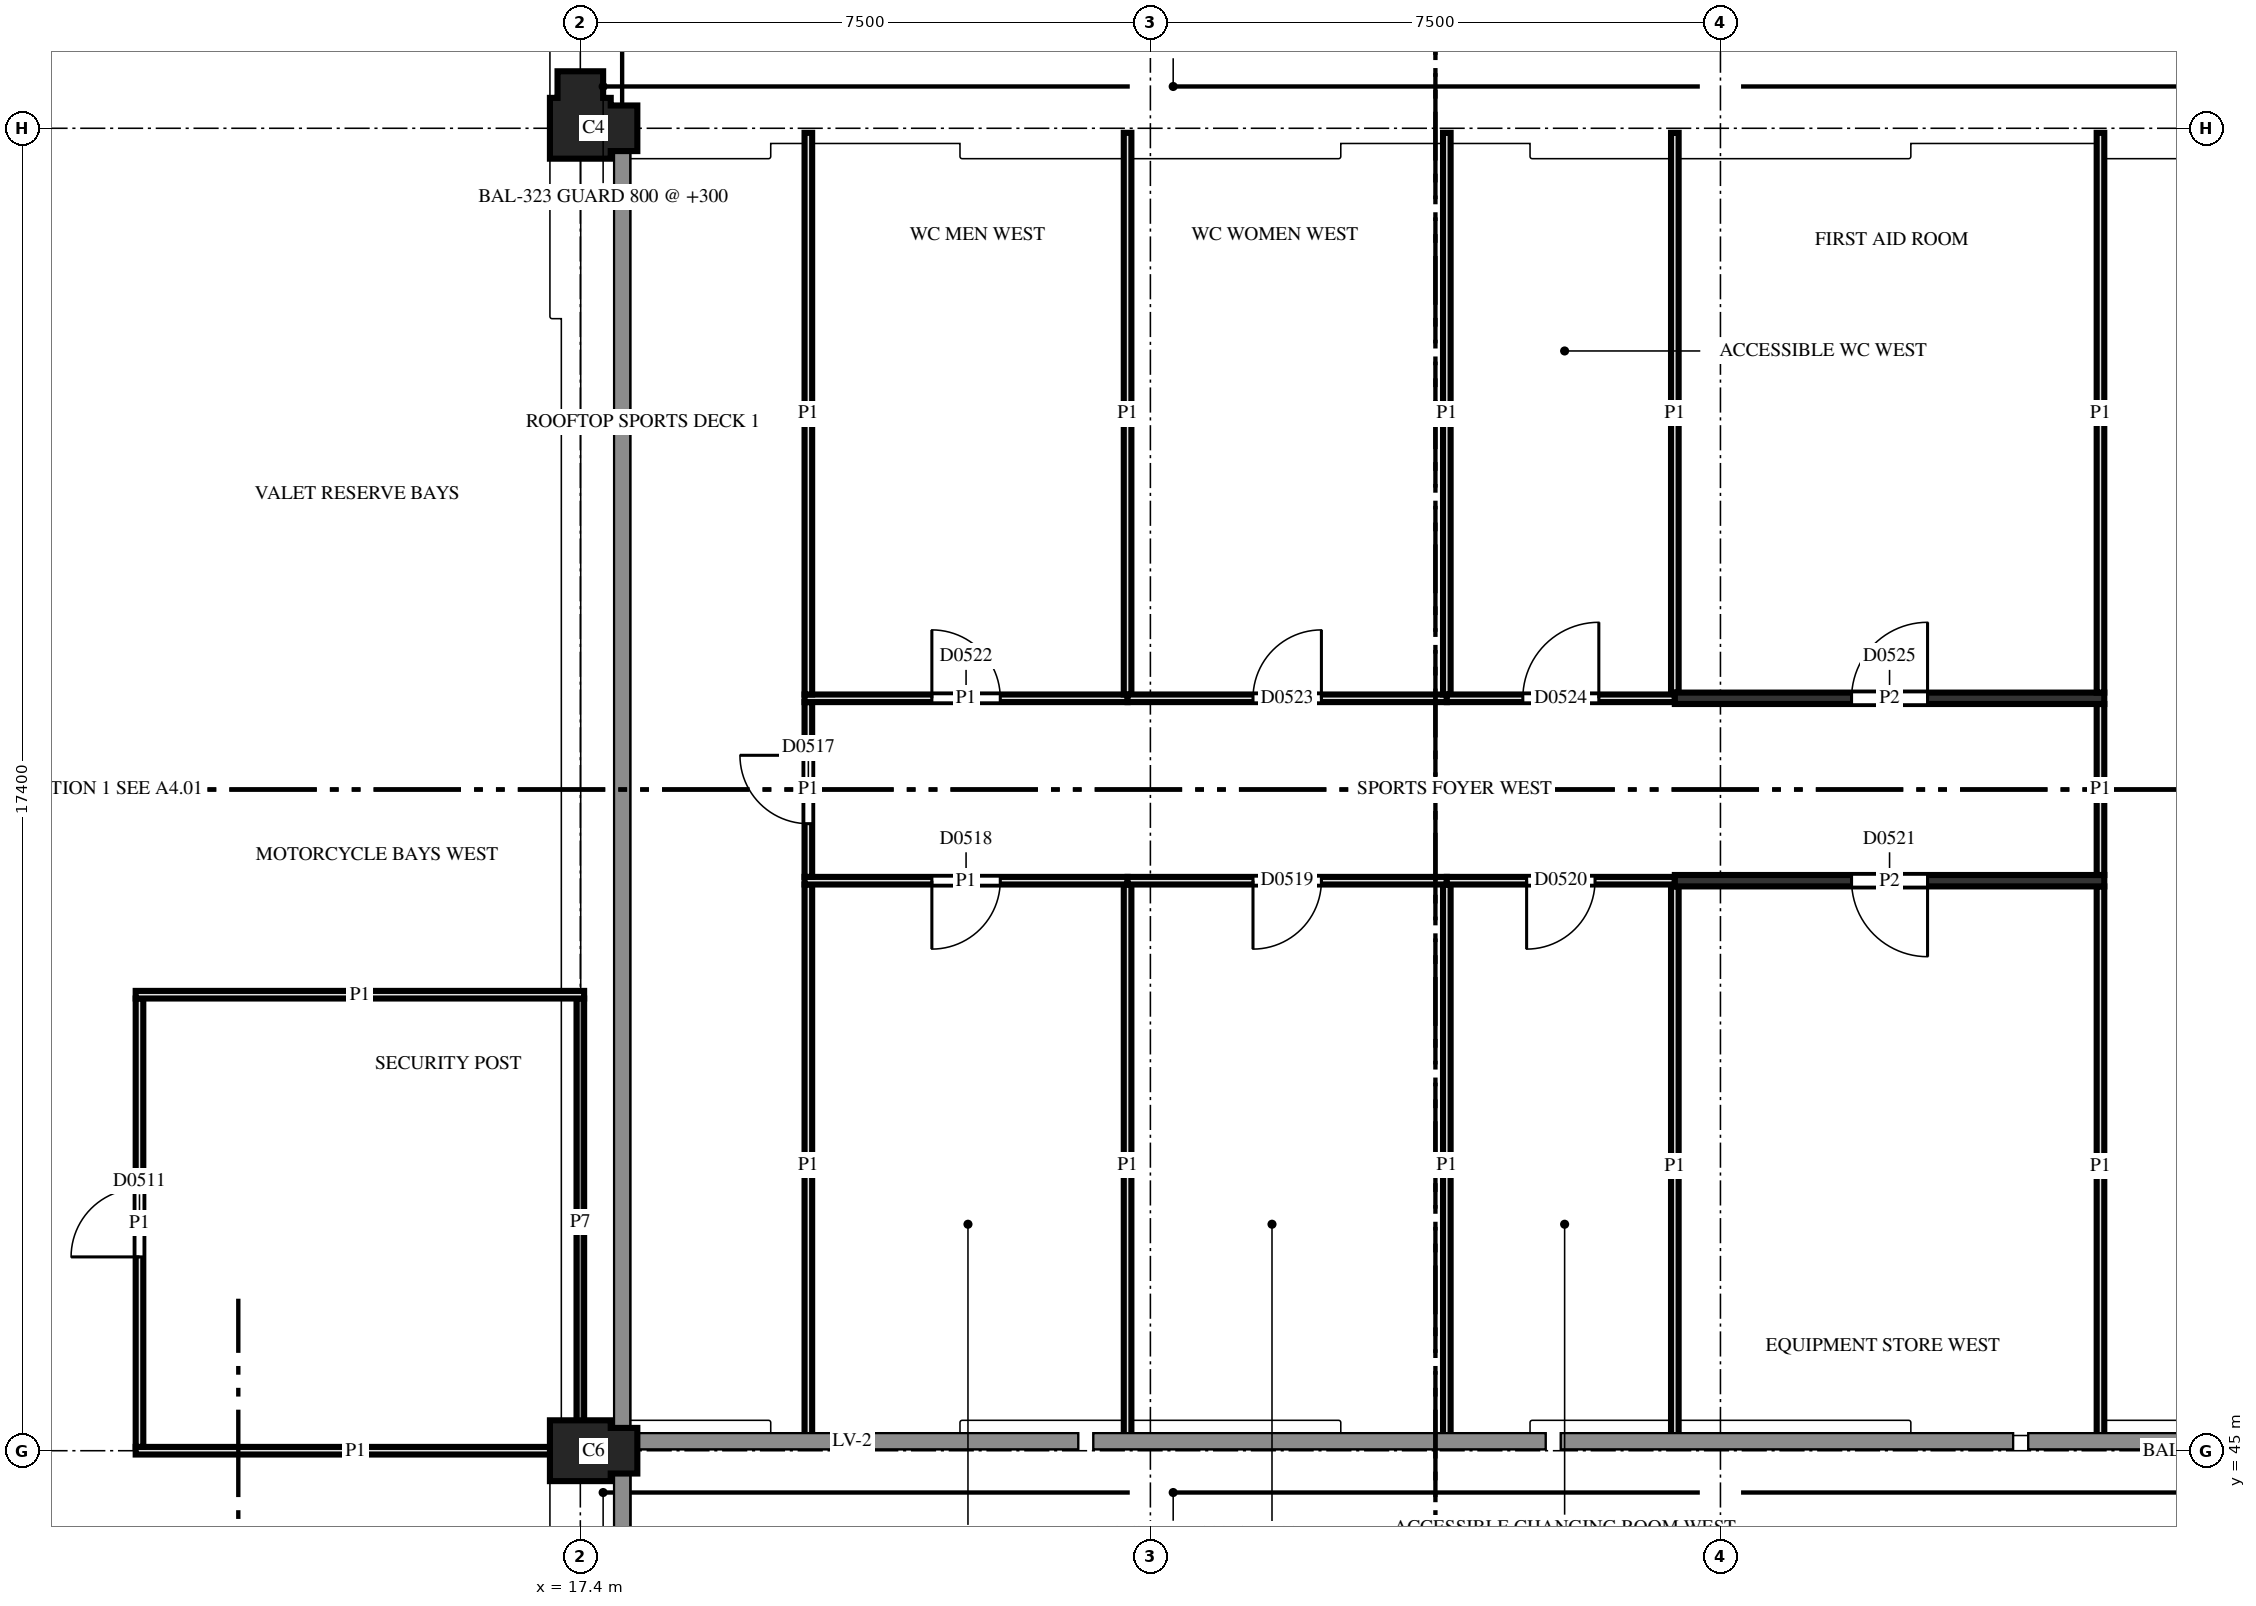
"""IFC4 building model, lengths in metres.
Left out: names, types, materials, properties, quantities, classifications, styles, units other than length and angle.
Written with IfcOpenShell. Run it as: python <this file> out.ifc"""

import sys

from ifc_helpers import new_model, si_unit, direction, frame, frame_2d, origin, place, context, subcontext, project, spatial, polyline, rectangle, outline, extrude, element, fill, save


model = new_model("IFC4")
c1 = context("Model", 3, precision=1e-05, world=origin(), true_north=direction((0.0, 1.0)))
c2 = subcontext(c1, "Body", "Model", "MODEL_VIEW")
j1 = project(units=[si_unit("LENGTHUNIT", "METRE"), si_unit("PLANEANGLEUNIT", "RADIAN")], contexts=[c1])
p1 = place(None, origin())
s1 = spatial("IfcSite", under=j1, at=p1, CompositionType="ELEMENT")
p2 = place(p1, origin())
s2 = spatial("IfcBuilding", under=s1, at=p2, CompositionType="ELEMENT")
p3 = place(p2, frame((0.0, 0.0, 19.3)))
s3 = spatial("IfcBuildingStorey", under=s2, at=p3, CompositionType="ELEMENT", Elevation=19.3)
p4 = place(p3, frame((17.4, 45.0, 0.0), z_axis=(0.0, 0.0, 1.0), x_axis=(1.0, 0.0, 0.0)))
e1 = element("IfcColumn", 1, at=p4, inside=s3, PredefinedType="COLUMN", context=c2, shape_type="SweptSolid", body=[
    extrude(outline(polyline([(-0.4, -0.4), (0.4, -0.4), (0.4, -0.3), (0.75, -0.3), (0.75, 0.3), (0.4, 0.3), (0.4, 0.4), (-0.4, 0.4), (-0.4, -0.4)])), origin(), (0.0, 0.0, 1.0), 3.7),
])
p5 = place(p3, frame((17.4, 62.4, 0.0), z_axis=(0.0, 0.0, 1.0), x_axis=(1.0, 0.0, 0.0)))
e2 = element("IfcColumn", 2, at=p5, inside=s3, PredefinedType="COLUMN", context=c2, shape_type="SweptSolid", body=[
    extrude(outline(polyline([(-0.4, -0.4), (0.4, -0.4), (0.4, -0.3), (0.75, -0.3), (0.75, 0.3), (0.4, 0.3), (0.4, 0.4), (0.3, 0.4), (0.3, 0.75), (-0.3, 0.75), (-0.3, 0.4), (-0.4, 0.4), (-0.4, -0.4)])), origin(), (0.0, 0.0, 1.0), 3.7),
])
p6 = place(p3, frame((11.55, 45.0, 0.0), z_axis=(0.0, 0.0, 1.0), x_axis=(1.0, 0.0, 0.0)))
e3 = element("IfcWall", 3, at=p6, inside=s3, PredefinedType="PARTITIONING", context=c2, shape_type="SweptSolid", body=[
    extrude(rectangle(XDim=5.79, YDim=0.1, at=frame_2d((2.895, 0.0))), origin(), (0.0, 0.0, 1.0), 2.88),
])
p7 = place(p3, frame((17.4, 45.06, 0.0), z_axis=(0.0, 0.0, 1.0), x_axis=(0.0, 1.0, 0.0)))
e4 = element("IfcWall", 4, at=p7, inside=s3, PredefinedType="PARTITIONING", context=c2, shape_type="SweptSolid", body=[
    extrude(rectangle(XDim=5.89, YDim=0.1, at=frame_2d((2.945, 0.0))), origin(), (0.0, 0.0, 1.0), 2.2),
])
for number, where, z_axis, x_axis in (
    (5, (24.6, 45.06, 0.0), (0.0, 0.0, 1.0), (0.0, 1.0, 0.0)),
    (6, (28.8, 45.06, 0.0), (0.0, 0.0, 1.0), (0.0, 1.0, 0.0)),
):
    element("IfcWall", number, at=place(p3, frame(where, z_axis=z_axis, x_axis=x_axis)), inside=s3, PredefinedType="PARTITIONING", context=c2, shape_type="SweptSolid", body=[
        extrude(rectangle(XDim=7.39, YDim=0.1, at=frame_2d((3.695, 0.0))), origin(), (0.0, 0.0, 1.0), 2.88),
    ])
for number, where, z_axis, x_axis in (
    (7, (31.8, 45.06, 0.0), (0.0, 0.0, 1.0), (0.0, 1.0, 0.0)),
    (8, (37.4, 45.06, 0.0), (0.0, 0.0, 1.0), (0.0, 1.0, 0.0)),
):
    element("IfcWall", number, at=place(p3, frame(where, z_axis=z_axis, x_axis=x_axis)), inside=s3, PredefinedType="PARTITIONING", context=c2, shape_type="SweptSolid", body=[
        extrude(rectangle(XDim=7.365, YDim=0.1, at=frame_2d((3.683, 0.0))), origin(), (0.0, 0.0, 1.0), 2.88),
    ])
p8 = place(p3, frame((11.6, 50.95, 0.0), z_axis=(0.0, 0.0, 1.0), x_axis=(0.0, -1.0, 0.0)))
e9 = element("IfcWall", 9, at=p8, inside=s3, PredefinedType="PARTITIONING", context=c2, shape_type="SweptSolid", body=[
    extrude(rectangle(XDim=5.9, YDim=0.1, at=frame_2d((2.95, 0.0))), origin(), (0.0, 0.0, 1.0), 2.88),
])
p9 = place(p8, frame((2.5, 0.0, 0.0)))
e10 = element("IfcOpeningElement", 10, at=p9, cuts=e9, PredefinedType="OPENING", context=c2, shape_type="SweptSolid", body=[
    extrude(rectangle(XDim=0.9, YDim=2.1, at=frame_2d((0.45, 1.05))), frame((0.0, 0.06, 0.0), z_axis=(0.0, -1.0, 0.0), x_axis=(1.0, 0.0, 0.0)), (0.0, 0.0, 1.0), 0.12),
])
p10 = place(p3, frame((17.45, 51.0, 0.0), z_axis=(0.0, 0.0, 1.0), x_axis=(-1.0, 0.0, 0.0)))
e11 = element("IfcWall", 11, at=p10, inside=s3, PredefinedType="PARTITIONING", context=c2, shape_type="SweptSolid", body=[
    extrude(rectangle(XDim=5.9, YDim=0.1, at=frame_2d((2.95, 0.0))), origin(), (0.0, 0.0, 1.0), 2.88),
])
p11 = place(p3, frame((20.4, 52.45, 0.0), z_axis=(0.0, 0.0, 1.0), x_axis=(0.0, -1.0, 0.0)))
e12 = element("IfcWall", 12, at=p11, inside=s3, PredefinedType="PARTITIONING", context=c2, shape_type="SweptSolid", body=[
    extrude(rectangle(XDim=7.39, YDim=0.1, at=frame_2d((3.695, 0.0))), origin(), (0.0, 0.0, 1.0), 2.88),
])
p12 = place(p3, frame((20.35, 52.5, 0.0), z_axis=(0.0, 0.0, 1.0), x_axis=(1.0, 0.0, 0.0)))
e13 = element("IfcWall", 13, at=p12, inside=s3, PredefinedType="PARTITIONING", context=c2, shape_type="SweptSolid", body=[
    extrude(rectangle(XDim=4.25, YDim=0.1, at=frame_2d((2.125, 0.0))), origin(), (0.0, 0.0, 1.0), 2.88),
])
p13 = place(p12, frame((1.675, 0.0, 0.0)))
e14 = element("IfcOpeningElement", 14, at=p13, cuts=e13, PredefinedType="OPENING", context=c2, shape_type="SweptSolid", body=[
    extrude(rectangle(XDim=0.9, YDim=2.1, at=frame_2d((0.45, 1.05))), frame((0.0, 0.06, 0.0), z_axis=(0.0, -1.0, 0.0), x_axis=(1.0, 0.0, 0.0)), (0.0, 0.0, 1.0), 0.12),
])
p14 = place(p3, frame((24.6, 52.5, 0.0), z_axis=(0.0, 0.0, 1.0), x_axis=(1.0, 0.0, 0.0)))
e15 = element("IfcWall", 15, at=p14, inside=s3, PredefinedType="PARTITIONING", context=c2, shape_type="SweptSolid", body=[
    extrude(rectangle(XDim=4.2, YDim=0.1, at=frame_2d((2.1, 0.0))), origin(), (0.0, 0.0, 1.0), 2.88),
])
p15 = place(p14, frame((1.65, 0.0, 0.0)))
e16 = element("IfcOpeningElement", 16, at=p15, cuts=e15, PredefinedType="OPENING", context=c2, shape_type="SweptSolid", body=[
    extrude(rectangle(XDim=0.9, YDim=2.1, at=frame_2d((0.45, 1.05))), frame((0.0, 0.06, 0.0), z_axis=(0.0, -1.0, 0.0), x_axis=(1.0, 0.0, 0.0)), (0.0, 0.0, 1.0), 0.12),
])
p16 = place(p3, frame((28.8, 52.5, 0.0), z_axis=(0.0, 0.0, 1.0), x_axis=(1.0, 0.0, 0.0)))
e17 = element("IfcWall", 17, at=p16, inside=s3, PredefinedType="PARTITIONING", context=c2, shape_type="SweptSolid", body=[
    extrude(rectangle(XDim=3.0, YDim=0.1, at=frame_2d((1.5, 0.0))), origin(), (0.0, 0.0, 1.0), 2.88),
])
p17 = place(p16, frame((1.05, 0.0, 0.0)))
e18 = element("IfcOpeningElement", 18, at=p17, cuts=e17, PredefinedType="OPENING", context=c2, shape_type="SweptSolid", body=[
    extrude(rectangle(XDim=0.9, YDim=2.1, at=frame_2d((0.45, 1.05))), frame((0.0, 0.06, 0.0), z_axis=(0.0, -1.0, 0.0), x_axis=(1.0, 0.0, 0.0)), (0.0, 0.0, 1.0), 0.12),
])
p18 = place(p3, frame((31.8, 52.5, 0.0), z_axis=(0.0, 0.0, 1.0), x_axis=(1.0, 0.0, 0.0)))
e19 = element("IfcWall", 19, at=p18, inside=s3, PredefinedType="PARTITIONING", context=c2, shape_type="SweptSolid", body=[
    extrude(rectangle(XDim=5.65, YDim=0.15, at=frame_2d((2.825, 0.0))), origin(), (0.0, 0.0, 1.0), 2.88),
])
p19 = place(p18, frame((2.325, 0.0, 0.0)))
e20 = element("IfcOpeningElement", 20, at=p19, cuts=e19, PredefinedType="OPENING", context=c2, shape_type="SweptSolid", body=[
    extrude(rectangle(XDim=1.0, YDim=2.1, at=frame_2d((0.5, 1.05))), frame((0.0, 0.085, 0.0), z_axis=(0.0, -1.0, 0.0), x_axis=(1.0, 0.0, 0.0)), (0.0, 0.0, 1.0), 0.17),
])
p20 = place(p3, frame((37.4, 52.575, 0.0), z_axis=(0.0, 0.0, 1.0), x_axis=(0.0, 1.0, 0.0)))
e21 = element("IfcWall", 21, at=p20, inside=s3, PredefinedType="PARTITIONING", context=c2, shape_type="SweptSolid", body=[
    extrude(rectangle(XDim=2.25, YDim=0.1, at=frame_2d((1.125, 0.0))), origin(), (0.0, 0.0, 1.0), 2.88),
])
p21 = place(p3, frame((20.4, 54.85, 0.0), z_axis=(0.0, 0.0, 1.0), x_axis=(0.0, -1.0, 0.0)))
e22 = element("IfcWall", 22, at=p21, inside=s3, PredefinedType="PARTITIONING", context=c2, shape_type="SweptSolid", body=[
    extrude(rectangle(XDim=2.3, YDim=0.1, at=frame_2d((1.15, 0.0))), origin(), (0.0, 0.0, 1.0), 2.88),
])
p22 = place(p21, frame((0.7, 0.0, 0.0)))
e23 = element("IfcOpeningElement", 23, at=p22, cuts=e22, PredefinedType="OPENING", context=c2, shape_type="SweptSolid", body=[
    extrude(rectangle(XDim=0.9, YDim=2.1, at=frame_2d((0.45, 1.05))), frame((0.0, 0.06, 0.0), z_axis=(0.0, -1.0, 0.0), x_axis=(1.0, 0.0, 0.0)), (0.0, 0.0, 1.0), 0.12),
])
p23 = place(p3, frame((24.6, 54.9, 0.0), z_axis=(0.0, 0.0, 1.0), x_axis=(-1.0, 0.0, 0.0)))
e24 = element("IfcWall", 24, at=p23, inside=s3, PredefinedType="PARTITIONING", context=c2, shape_type="SweptSolid", body=[
    extrude(rectangle(XDim=4.25, YDim=0.1, at=frame_2d((2.125, 0.0))), origin(), (0.0, 0.0, 1.0), 2.88),
])
p24 = place(p23, frame((1.675, 0.0, 0.0)))
e25 = element("IfcOpeningElement", 25, at=p24, cuts=e24, PredefinedType="OPENING", context=c2, shape_type="SweptSolid", body=[
    extrude(rectangle(XDim=0.9, YDim=2.1, at=frame_2d((0.45, 1.05))), frame((0.0, 0.06, 0.0), z_axis=(0.0, -1.0, 0.0), x_axis=(1.0, 0.0, 0.0)), (0.0, 0.0, 1.0), 0.12),
])
p25 = place(p3, frame((24.6, 54.95, 0.0), z_axis=(0.0, 0.0, 1.0), x_axis=(0.0, 1.0, 0.0)))
e26 = element("IfcWall", 26, at=p25, inside=s3, PredefinedType="PARTITIONING", context=c2, shape_type="SweptSolid", body=[
    extrude(rectangle(XDim=7.39, YDim=0.1, at=frame_2d((3.695, 0.0))), origin(), (0.0, 0.0, 1.0), 2.88),
])
p26 = place(p3, frame((28.8, 54.9, 0.0), z_axis=(0.0, 0.0, 1.0), x_axis=(-1.0, 0.0, 0.0)))
e27 = element("IfcWall", 27, at=p26, inside=s3, PredefinedType="PARTITIONING", context=c2, shape_type="SweptSolid", body=[
    extrude(rectangle(XDim=4.2, YDim=0.1, at=frame_2d((2.1, 0.0))), origin(), (0.0, 0.0, 1.0), 2.88),
])
p27 = place(p26, frame((1.65, 0.0, 0.0)))
e28 = element("IfcOpeningElement", 28, at=p27, cuts=e27, PredefinedType="OPENING", context=c2, shape_type="SweptSolid", body=[
    extrude(rectangle(XDim=0.9, YDim=2.1, at=frame_2d((0.45, 1.05))), frame((0.0, 0.06, 0.0), z_axis=(0.0, -1.0, 0.0), x_axis=(1.0, 0.0, 0.0)), (0.0, 0.0, 1.0), 0.12),
])
p28 = place(p3, frame((28.8, 54.95, 0.0), z_axis=(0.0, 0.0, 1.0), x_axis=(0.0, 1.0, 0.0)))
e29 = element("IfcWall", 29, at=p28, inside=s3, PredefinedType="PARTITIONING", context=c2, shape_type="SweptSolid", body=[
    extrude(rectangle(XDim=7.39, YDim=0.1, at=frame_2d((3.695, 0.0))), origin(), (0.0, 0.0, 1.0), 2.88),
])
p29 = place(p3, frame((31.8, 54.9, 0.0), z_axis=(0.0, 0.0, 1.0), x_axis=(-1.0, 0.0, 0.0)))
e30 = element("IfcWall", 30, at=p29, inside=s3, PredefinedType="PARTITIONING", context=c2, shape_type="SweptSolid", body=[
    extrude(rectangle(XDim=3.0, YDim=0.1, at=frame_2d((1.5, 0.0))), origin(), (0.0, 0.0, 1.0), 2.88),
])
p30 = place(p29, frame((1.0, 0.0, 0.0)))
e31 = element("IfcOpeningElement", 31, at=p30, cuts=e30, PredefinedType="OPENING", context=c2, shape_type="SweptSolid", body=[
    extrude(rectangle(XDim=1.0, YDim=2.1, at=frame_2d((0.5, 1.05))), frame((0.0, 0.06, 0.0), z_axis=(0.0, -1.0, 0.0), x_axis=(1.0, 0.0, 0.0)), (0.0, 0.0, 1.0), 0.12),
])
p31 = place(p3, frame((31.8, 54.975, 0.0), z_axis=(0.0, 0.0, 1.0), x_axis=(0.0, 1.0, 0.0)))
e32 = element("IfcWall", 32, at=p31, inside=s3, PredefinedType="PARTITIONING", context=c2, shape_type="SweptSolid", body=[
    extrude(rectangle(XDim=7.365, YDim=0.1, at=frame_2d((3.683, 0.0))), origin(), (0.0, 0.0, 1.0), 2.88),
])
p32 = place(p3, frame((37.45, 54.9, 0.0), z_axis=(0.0, 0.0, 1.0), x_axis=(-1.0, 0.0, 0.0)))
e33 = element("IfcWall", 33, at=p32, inside=s3, PredefinedType="PARTITIONING", context=c2, shape_type="SweptSolid", body=[
    extrude(rectangle(XDim=5.65, YDim=0.15, at=frame_2d((2.825, 0.0))), origin(), (0.0, 0.0, 1.0), 2.88),
])
p33 = place(p32, frame((2.325, 0.0, 0.0)))
e34 = element("IfcOpeningElement", 34, at=p33, cuts=e33, PredefinedType="OPENING", context=c2, shape_type="SweptSolid", body=[
    extrude(rectangle(XDim=1.0, YDim=2.1, at=frame_2d((0.5, 1.05))), frame((0.0, 0.085, 0.0), z_axis=(0.0, -1.0, 0.0), x_axis=(1.0, 0.0, 0.0)), (0.0, 0.0, 1.0), 0.17),
])
p34 = place(p3, frame((37.4, 54.975, 0.0), z_axis=(0.0, 0.0, 1.0), x_axis=(0.0, 1.0, 0.0)))
e35 = element("IfcWall", 35, at=p34, inside=s3, PredefinedType="PARTITIONING", context=c2, shape_type="SweptSolid", body=[
    extrude(rectangle(XDim=7.365, YDim=0.1, at=frame_2d((3.683, 0.0))), origin(), (0.0, 0.0, 1.0), 2.88),
])
p35 = place(p3, frame((20.4, 62.34, 0.0), z_axis=(0.0, 0.0, 1.0), x_axis=(0.0, -1.0, 0.0)))
e36 = element("IfcWall", 36, at=p35, inside=s3, PredefinedType="PARTITIONING", context=c2, shape_type="SweptSolid", body=[
    extrude(rectangle(XDim=7.39, YDim=0.1, at=frame_2d((3.695, 0.0))), origin(), (0.0, 0.0, 1.0), 2.88),
])
p36 = place(p9, origin())
e37 = element("IfcDoor", 37, at=p36, inside=s3, OperationType="SINGLE_SWING_RIGHT", PredefinedType="DOOR", context=c2, shape_type="SweptSolid", body=[
    extrude(rectangle(XDim=0.9, YDim=2.1, at=frame_2d((0.45, 1.05))), frame((0.0, 0.025, 0.0), z_axis=(0.0, -1.0, 0.0), x_axis=(1.0, 0.0, 0.0)), (0.0, 0.0, 1.0), 0.05),
])
fill(e10, e37)
p37 = place(p22, frame((0.9, 0.0, 0.0), z_axis=(0.0, 0.0, 1.0), x_axis=(-1.0, 0.0, 0.0)))
e38 = element("IfcDoor", 38, at=p37, inside=s3, OperationType="SINGLE_SWING_LEFT", PredefinedType="DOOR", context=c2, shape_type="SweptSolid", body=[
    extrude(rectangle(XDim=0.9, YDim=2.1, at=frame_2d((0.45, 1.05))), frame((0.0, 0.025, 0.0), z_axis=(0.0, -1.0, 0.0), x_axis=(1.0, 0.0, 0.0)), (0.0, 0.0, 1.0), 0.05),
])
fill(e23, e38)
p38 = place(p13, origin())
e39 = element("IfcDoor", 39, at=p38, inside=s3, OperationType="SINGLE_SWING_LEFT", PredefinedType="DOOR", context=c2, shape_type="SweptSolid", body=[
    extrude(rectangle(XDim=0.9, YDim=2.1, at=frame_2d((0.45, 1.05))), frame((0.0, 0.025, 0.0), z_axis=(0.0, -1.0, 0.0), x_axis=(1.0, 0.0, 0.0)), (0.0, 0.0, 1.0), 0.05),
])
fill(e14, e39)
p39 = place(p15, origin())
e40 = element("IfcDoor", 40, at=p39, inside=s3, OperationType="SINGLE_SWING_LEFT", PredefinedType="DOOR", context=c2, shape_type="SweptSolid", body=[
    extrude(rectangle(XDim=0.9, YDim=2.1, at=frame_2d((0.45, 1.05))), frame((0.0, 0.025, 0.0), z_axis=(0.0, -1.0, 0.0), x_axis=(1.0, 0.0, 0.0)), (0.0, 0.0, 1.0), 0.05),
])
fill(e16, e40)
p40 = place(p17, origin())
e41 = element("IfcDoor", 41, at=p40, inside=s3, OperationType="SINGLE_SWING_LEFT", PredefinedType="DOOR", context=c2, shape_type="SweptSolid", body=[
    extrude(rectangle(XDim=0.9, YDim=2.1, at=frame_2d((0.45, 1.05))), frame((0.0, 0.025, 0.0), z_axis=(0.0, -1.0, 0.0), x_axis=(1.0, 0.0, 0.0)), (0.0, 0.0, 1.0), 0.05),
])
fill(e18, e41)
p41 = place(p19, origin())
e42 = element("IfcDoor", 42, at=p41, inside=s3, OperationType="SINGLE_SWING_RIGHT", PredefinedType="DOOR", context=c2, shape_type="SweptSolid", body=[
    extrude(rectangle(XDim=1.0, YDim=2.1, at=frame_2d((0.5, 1.05))), frame((0.0, 0.025, 0.0), z_axis=(0.0, -1.0, 0.0), x_axis=(1.0, 0.0, 0.0)), (0.0, 0.0, 1.0), 0.05),
])
fill(e20, e42)
p42 = place(p24, origin())
e43 = element("IfcDoor", 43, at=p42, inside=s3, OperationType="SINGLE_SWING_RIGHT", PredefinedType="DOOR", context=c2, shape_type="SweptSolid", body=[
    extrude(rectangle(XDim=0.9, YDim=2.1, at=frame_2d((0.45, 1.05))), frame((0.0, 0.025, 0.0), z_axis=(0.0, -1.0, 0.0), x_axis=(1.0, 0.0, 0.0)), (0.0, 0.0, 1.0), 0.05),
])
fill(e25, e43)
p43 = place(p27, origin())
e44 = element("IfcDoor", 44, at=p43, inside=s3, OperationType="SINGLE_SWING_LEFT", PredefinedType="DOOR", context=c2, shape_type="SweptSolid", body=[
    extrude(rectangle(XDim=0.9, YDim=2.1, at=frame_2d((0.45, 1.05))), frame((0.0, 0.025, 0.0), z_axis=(0.0, -1.0, 0.0), x_axis=(1.0, 0.0, 0.0)), (0.0, 0.0, 1.0), 0.05),
])
fill(e28, e44)
p44 = place(p30, origin())
e45 = element("IfcDoor", 45, at=p44, inside=s3, OperationType="SINGLE_SWING_LEFT", PredefinedType="DOOR", context=c2, shape_type="SweptSolid", body=[
    extrude(rectangle(XDim=1.0, YDim=2.1, at=frame_2d((0.5, 1.05))), frame((0.0, 0.025, 0.0), z_axis=(0.0, -1.0, 0.0), x_axis=(1.0, 0.0, 0.0)), (0.0, 0.0, 1.0), 0.05),
])
fill(e31, e45)
p45 = place(p33, origin())
e46 = element("IfcDoor", 46, at=p45, inside=s3, OperationType="SINGLE_SWING_LEFT", PredefinedType="DOOR", context=c2, shape_type="SweptSolid", body=[
    extrude(rectangle(XDim=1.0, YDim=2.1, at=frame_2d((0.5, 1.05))), frame((0.0, 0.025, 0.0), z_axis=(0.0, -1.0, 0.0), x_axis=(1.0, 0.0, 0.0)), (0.0, 0.0, 1.0), 0.05),
])
fill(e34, e46)
save(model, sys.argv[1])
